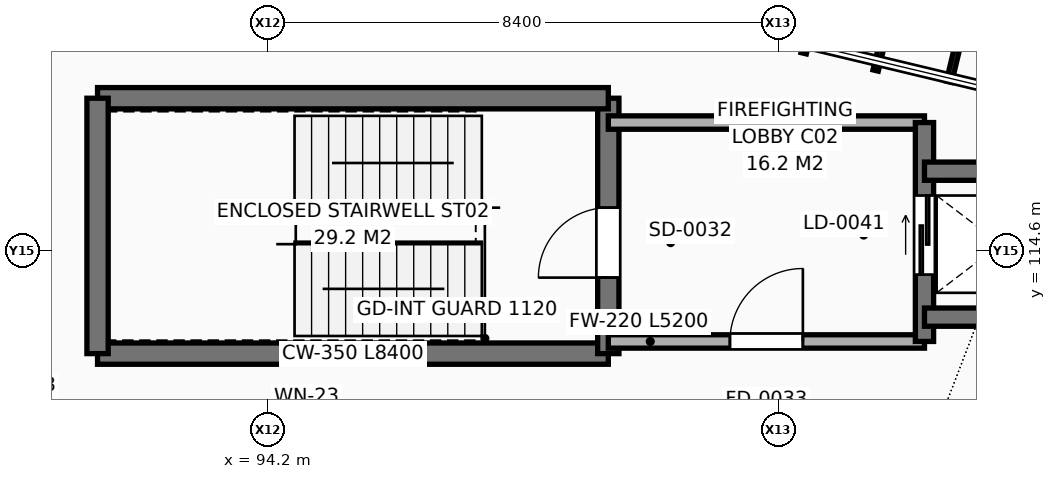
"""IFC4 building model, lengths in metres.
Left out: names, types, materials, properties, quantities, classifications, styles, units other than length and angle.
Written with IfcOpenShell. Run it as: python <this file> out.ifc"""

import sys

from ifc_helpers import new_model, si_unit, direction, frame, frame_2d, origin, place, context, subcontext, project, spatial, rectangle, extrude, element, fill, save


model = new_model("IFC4")
c1 = context("Model", 3, precision=1e-05, world=origin(), true_north=direction((0.0, 1.0)))
c2 = subcontext(c1, "Body", "Model", "MODEL_VIEW")
j1 = project(units=[si_unit("LENGTHUNIT", "METRE"), si_unit("PLANEANGLEUNIT", "RADIAN")], contexts=[c1])
p1 = place(None, origin())
s1 = spatial("IfcSite", under=j1, at=p1, CompositionType="ELEMENT")
p2 = place(p1, origin())
s2 = spatial("IfcBuilding", under=s1, at=p2, CompositionType="ELEMENT")
p3 = place(p2, frame((0.0, 0.0, 22.2)))
s3 = spatial("IfcBuildingStorey", under=s2, at=p3, CompositionType="ELEMENT", Elevation=22.2)
p4 = place(p3, frame((99.029, 111.496, 0.0), z_axis=(0.0, 0.0, 1.0), x_axis=(-0.999198007922, 0.040041740285, 0.0)))
e1 = element("IfcWall", 1, at=p4, inside=s3, PredefinedType="SOLIDWALL", context=c2, shape_type="SweptSolid", body=[
    extrude(rectangle(XDim=13.097, YDim=0.34, at=frame_2d((6.548, 0.0))), origin(), (0.0, 0.0, 1.0), 3.387),
])
p5 = place(p4, frame((3.766, 0.0, 0.9)))
e2 = element("IfcOpeningElement", 2, at=p5, cuts=e1, PredefinedType="OPENING", context=c2, shape_type="SweptSolid", body=[
    extrude(rectangle(XDim=0.9, YDim=2.2, at=frame_2d((0.45, 1.1))), frame((0.0, 0.18, 0.0), z_axis=(0.0, -1.0, 0.0), x_axis=(1.0, 0.0, 0.0)), (0.0, 0.0, 1.0), 0.36),
])
p6 = place(p4, frame((8.431, 0.0, 0.9)))
e3 = element("IfcOpeningElement", 3, at=p6, cuts=e1, PredefinedType="OPENING", context=c2, shape_type="SweptSolid", body=[
    extrude(rectangle(XDim=0.9, YDim=2.2, at=frame_2d((0.45, 1.1))), frame((0.0, 0.18, 0.0), z_axis=(0.0, -1.0, 0.0), x_axis=(1.0, 0.0, 0.0)), (0.0, 0.0, 1.0), 0.36),
])
p7 = place(p3, frame((91.4, 112.9, 0.0), z_axis=(0.0, 0.0, 1.0), x_axis=(1.0, 0.0, 0.0)))
e4 = element("IfcWall", 4, at=p7, inside=s3, PredefinedType="SHEAR", context=c2, shape_type="SweptSolid", body=[
    extrude(rectangle(XDim=8.4, YDim=0.35, at=frame_2d((4.2, 0.0))), origin(), (0.0, 0.0, 1.0), 3.92),
])
p8 = place(p3, frame((99.8, 112.9, 0.0), z_axis=(0.0, 0.0, 1.0), x_axis=(0.0, 1.0, 0.0)))
e5 = element("IfcWall", 5, at=p8, inside=s3, PredefinedType="SHEAR", context=c2, shape_type="SweptSolid", body=[
    extrude(rectangle(XDim=4.2, YDim=0.35, at=frame_2d((2.1, 0.0))), origin(), (0.0, 0.0, 1.0), 3.92),
])
p9 = place(p8, frame((1.25, 0.0, 0.0)))
e6 = element("IfcOpeningElement", 6, at=p9, cuts=e5, PredefinedType="OPENING", context=c2, shape_type="SweptSolid", body=[
    extrude(rectangle(XDim=1.15, YDim=2.2, at=frame_2d((0.575, 1.1))), frame((0.0, 0.185, 0.0), z_axis=(0.0, -1.0, 0.0), x_axis=(1.0, 0.0, 0.0)), (0.0, 0.0, 1.0), 0.37),
])
p10 = place(p3, frame((99.8, 117.1, 0.0), z_axis=(0.0, 0.0, 1.0), x_axis=(-1.0, 0.0, 0.0)))
e7 = element("IfcWall", 7, at=p10, inside=s3, PredefinedType="SHEAR", context=c2, shape_type="SweptSolid", body=[
    extrude(rectangle(XDim=8.4, YDim=0.35, at=frame_2d((4.2, 0.0))), origin(), (0.0, 0.0, 1.0), 3.92),
])
p11 = place(p3, frame((91.4, 117.1, 0.0), z_axis=(0.0, 0.0, 1.0), x_axis=(0.0, -1.0, 0.0)))
e8 = element("IfcWall", 8, at=p11, inside=s3, PredefinedType="SHEAR", context=c2, shape_type="SweptSolid", body=[
    extrude(rectangle(XDim=4.2, YDim=0.35, at=frame_2d((2.1, 0.0))), origin(), (0.0, 0.0, 1.0), 3.92),
])
p12 = place(p3, frame((99.8, 113.1, 0.0), z_axis=(0.0, 0.0, 1.0), x_axis=(1.0, 0.0, 0.0)))
e9 = element("IfcWall", 9, at=p12, inside=s3, PredefinedType="SOLIDWALL", context=c2, shape_type="SweptSolid", body=[
    extrude(rectangle(XDim=5.2, YDim=0.22, at=frame_2d((2.6, 0.0))), origin(), (0.0, 0.0, 1.0), 3.92),
])
p13 = place(p12, frame((2.0, 0.0, 0.0)))
e10 = element("IfcOpeningElement", 10, at=p13, cuts=e9, PredefinedType="OPENING", context=c2, shape_type="SweptSolid", body=[
    extrude(rectangle(XDim=1.2, YDim=2.2, at=frame_2d((0.6, 1.1))), frame((0.0, 0.12, 0.0), z_axis=(0.0, -1.0, 0.0), x_axis=(1.0, 0.0, 0.0)), (0.0, 0.0, 1.0), 0.24),
])
p14 = place(p3, frame((105.0, 116.7, 0.0), z_axis=(0.0, 0.0, 1.0), x_axis=(-1.0, 0.0, 0.0)))
e11 = element("IfcWall", 11, at=p14, inside=s3, PredefinedType="SOLIDWALL", context=c2, shape_type="SweptSolid", body=[
    extrude(rectangle(XDim=5.2, YDim=0.22, at=frame_2d((2.6, 0.0))), origin(), (0.0, 0.0, 1.0), 3.92),
])
p15 = place(p3, frame((105.0, 113.1, 0.0), z_axis=(0.0, 0.0, 1.0), x_axis=(0.0, 1.0, 0.0)))
e12 = element("IfcWall", 12, at=p15, inside=s3, PredefinedType="SHEAR", context=c2, shape_type="SweptSolid", body=[
    extrude(rectangle(XDim=3.6, YDim=0.3, at=frame_2d((1.8, 0.0))), origin(), (0.0, 0.0, 1.0), 3.92),
])
p16 = place(p15, frame((1.1, 0.0, 0.0)))
e13 = element("IfcOpeningElement", 13, at=p16, cuts=e12, PredefinedType="OPENING", context=c2, shape_type="SweptSolid", body=[
    extrude(rectangle(XDim=1.3, YDim=2.3, at=frame_2d((0.65, 1.15))), frame((0.0, 0.16, 0.0), z_axis=(0.0, -1.0, 0.0), x_axis=(1.0, 0.0, 0.0)), (0.0, 0.0, 1.0), 0.32),
])
for number, where, z_axis, x_axis in (
    (14, (107.5, 115.9, 0.0), (0.0, 0.0, 1.0), (-1.0, 0.0, 0.0)),
    (15, (105.0, 113.5, 0.0), (0.0, 0.0, 1.0), (1.0, 0.0, 0.0)),
):
    element("IfcWall", number, at=place(p3, frame(where, z_axis=z_axis, x_axis=x_axis)), inside=s3, PredefinedType="SHEAR", context=c2, shape_type="SweptSolid", body=[
        extrude(rectangle(XDim=2.5, YDim=0.3, at=frame_2d((1.25, 0.0))), origin(), (0.0, 0.0, 1.0), 3.92),
    ])
p17 = place(p9, origin())
e16 = element("IfcDoor", 16, at=p17, inside=s3, OperationType="SINGLE_SWING_LEFT", PredefinedType="DOOR", context=c2, shape_type="SweptSolid", body=[
    extrude(rectangle(XDim=1.15, YDim=2.2, at=frame_2d((0.575, 1.1))), frame((0.0, 0.025, 0.0), z_axis=(0.0, -1.0, 0.0), x_axis=(1.0, 0.0, 0.0)), (0.0, 0.0, 1.0), 0.05),
])
fill(e6, e16)
p18 = place(p13, origin())
e17 = element("IfcDoor", 17, at=p18, inside=s3, OperationType="SINGLE_SWING_RIGHT", PredefinedType="DOOR", context=c2, shape_type="SweptSolid", body=[
    extrude(rectangle(XDim=1.2, YDim=2.2, at=frame_2d((0.6, 1.1))), frame((0.0, 0.025, 0.0), z_axis=(0.0, -1.0, 0.0), x_axis=(1.0, 0.0, 0.0)), (0.0, 0.0, 1.0), 0.05),
])
fill(e10, e17)
p19 = place(p16, origin())
e18 = element("IfcDoor", 18, at=p19, inside=s3, OperationType="SLIDING_TO_LEFT", PredefinedType="DOOR", context=c2, shape_type="SweptSolid", body=[
    extrude(rectangle(XDim=1.3, YDim=2.3, at=frame_2d((0.65, 1.15))), frame((0.0, 0.025, 0.0), z_axis=(0.0, -1.0, 0.0), x_axis=(1.0, 0.0, 0.0)), (0.0, 0.0, 1.0), 0.05),
])
fill(e13, e18)
save(model, sys.argv[1])
